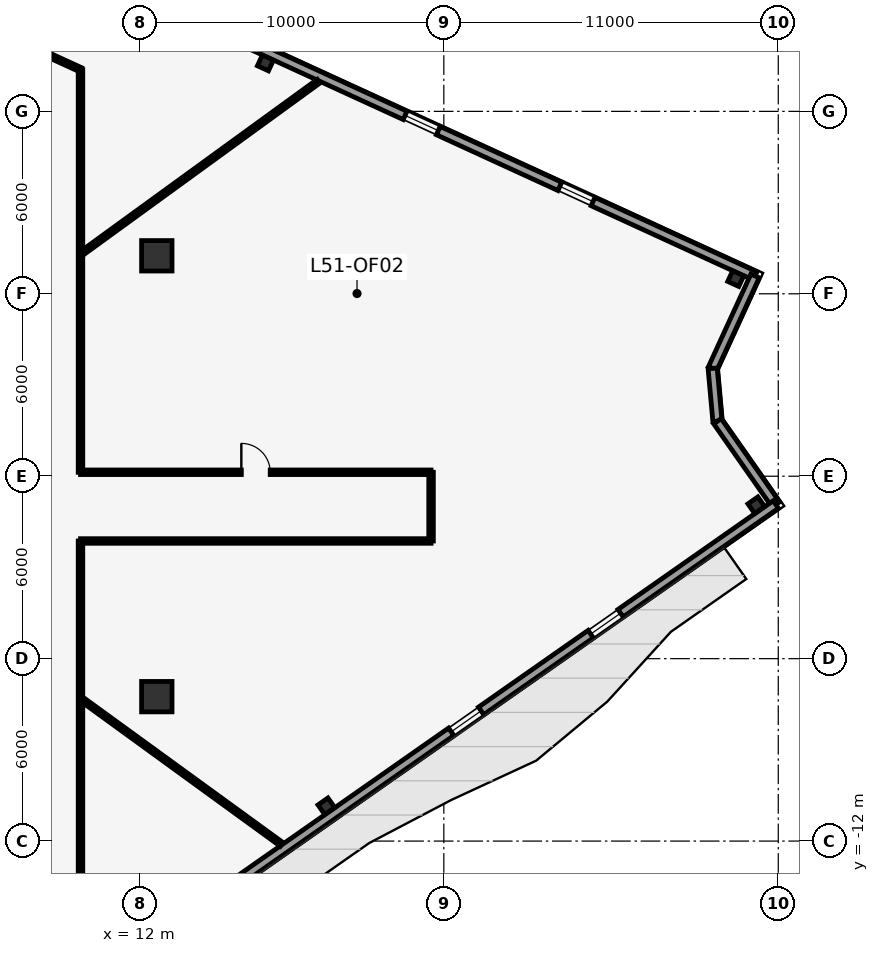
"""IFC4 building model, lengths in metres.
Left out: names, types, materials, properties, quantities, classifications, styles, units other than length and angle.
Written with IfcOpenShell. Run it as: python <this file> out.ifc"""

import sys

from ifc_helpers import new_model, si_unit, direction, frame, frame_2d, origin, origin_2d, place, context, subcontext, project, spatial, rectangle, i_section, extrude, element, fill, save


model = new_model("IFC4")
c1 = context("Model", 3, precision=1e-05, world=origin(), true_north=direction((0.0, 1.0)))
c2 = subcontext(c1, "Body", "Model", "MODEL_VIEW")
j1 = project(units=[si_unit("LENGTHUNIT", "METRE"), si_unit("PLANEANGLEUNIT", "RADIAN")], contexts=[c1])
p1 = place(None, origin())
s1 = spatial("IfcSite", under=j1, at=p1, CompositionType="ELEMENT")
p2 = place(p1, origin())
s2 = spatial("IfcBuilding", under=s1, at=p2, CompositionType="ELEMENT")
p3 = place(p2, frame((0.0, 0.0, 218.8)))
s3 = spatial("IfcBuildingStorey", under=s2, at=p3, CompositionType="ELEMENT", Elevation=218.8)
for number, where, z_axis, x_axis in (
    (1, (12.56, -7.25, 0.0), (0.0, 0.0, 1.0), (1.0, 0.0, 0.0)),
    (2, (12.56, 7.25, 0.0), (0.0, 0.0, 1.0), (1.0, 0.0, 0.0)),
):
    element("IfcColumn", number, at=place(p3, frame(where, z_axis=z_axis, x_axis=x_axis)), inside=s3, PredefinedType="COLUMN", context=c2, shape_type="SweptSolid", body=[
        extrude(rectangle(XDim=1.0, YDim=1.0, at=origin_2d()), origin(), (0.0, 0.0, 1.0), 4.1),
    ])
for number, where, z_axis, x_axis in (
    (3, (18.137, -10.854, 0.0), (0.0, 0.0, 1.0), (0.819, 0.574, 0.0)),
    (4, (32.277, -0.953, 0.0), (0.0, 0.0, 1.0), (0.819, 0.574, 0.0)),
    (5, (31.601, 6.499, 0.0), (0.0, 0.0, 1.0), (-0.909, 0.417, 0.0)),
    (6, (16.132, 13.592, 0.0), (0.0, 0.0, 1.0), (-0.909, 0.417, 0.0)),
):
    element("IfcColumn", number, at=place(p3, frame(where, z_axis=z_axis, x_axis=x_axis)), inside=s3, PredefinedType="COLUMN", context=c2, shape_type="SweptSolid", body=[
        extrude(i_section(OverallWidth=0.399, OverallDepth=0.386, WebThickness=0.021, FlangeThickness=0.033, at=origin_2d()), origin(), (0.0, 0.0, 1.0), 4.1),
    ])
p4 = place(p3, frame((-15.144, 28.322, 0.0), z_axis=(0.0, 0.0, 1.0), x_axis=(0.908932099953, -0.416944166136, 0.0)))
e7 = element("IfcWall", 7, at=p4, inside=s3, PredefinedType="STANDARD", context=c2, shape_type="SweptSolid", body=[
    extrude(rectangle(XDim=52.128, YDim=0.3, at=frame_2d((26.064, 0.0))), origin(), (0.0, 0.0, 1.0), 3.85),
])
p5 = place(p4, frame((5.864, 0.0, 0.85)))
e8 = element("IfcOpeningElement", 8, at=p5, cuts=e7, PredefinedType="OPENING", context=c2, shape_type="SweptSolid", body=[
    extrude(rectangle(XDim=1.2, YDim=2.2, at=frame_2d((0.6, 1.1))), frame((0.0, 0.16, 0.0), z_axis=(0.0, -1.0, 0.0), x_axis=(1.0, 0.0, 0.0)), (0.0, 0.0, 1.0), 0.32),
])
p6 = place(p4, frame((22.664, 0.0, 0.85)))
e9 = element("IfcOpeningElement", 9, at=p6, cuts=e7, PredefinedType="OPENING", context=c2, shape_type="SweptSolid", body=[
    extrude(rectangle(XDim=1.2, YDim=2.2, at=frame_2d((0.6, 1.1))), frame((0.0, 0.16, 0.0), z_axis=(0.0, -1.0, 0.0), x_axis=(1.0, 0.0, 0.0)), (0.0, 0.0, 1.0), 0.32),
])
p7 = place(p4, frame((28.264, 0.0, 0.85)))
e10 = element("IfcOpeningElement", 10, at=p7, cuts=e7, PredefinedType="OPENING", context=c2, shape_type="SweptSolid", body=[
    extrude(rectangle(XDim=1.2, YDim=2.2, at=frame_2d((0.6, 1.1))), frame((0.0, 0.16, 0.0), z_axis=(0.0, -1.0, 0.0), x_axis=(1.0, 0.0, 0.0)), (0.0, 0.0, 1.0), 0.32),
])
p8 = place(p4, frame((39.464, 0.0, 0.85)))
e11 = element("IfcOpeningElement", 11, at=p8, cuts=e7, PredefinedType="OPENING", context=c2, shape_type="SweptSolid", body=[
    extrude(rectangle(XDim=1.2, YDim=2.2, at=frame_2d((0.6, 1.1))), frame((0.0, 0.16, 0.0), z_axis=(0.0, -1.0, 0.0), x_axis=(1.0, 0.0, 0.0)), (0.0, 0.0, 1.0), 0.32),
])
p9 = place(p4, frame((45.064, 0.0, 0.85)))
e12 = element("IfcOpeningElement", 12, at=p9, cuts=e7, PredefinedType="OPENING", context=c2, shape_type="SweptSolid", body=[
    extrude(rectangle(XDim=1.2, YDim=2.2, at=frame_2d((0.6, 1.1))), frame((0.0, 0.16, 0.0), z_axis=(0.0, -1.0, 0.0), x_axis=(1.0, 0.0, 0.0)), (0.0, 0.0, 1.0), 0.32),
])
p10 = place(p3, frame((32.237, 6.587, 0.0), z_axis=(0.0, 0.0, 1.0), x_axis=(-0.416956203263, -0.908926578201, 0.0)))
e13 = element("IfcWall", 13, at=p10, inside=s3, PredefinedType="STANDARD", context=c2, shape_type="SweptSolid", body=[
    extrude(rectangle(XDim=3.346, YDim=0.3, at=frame_2d((1.673, 0.0))), origin(), (0.0, 0.0, 1.0), 3.85),
])
p11 = place(p3, frame((30.842, 3.546, 0.0), z_axis=(0.0, 0.0, 1.0), x_axis=(0.09030850916, -0.995913838228, 0.0)))
e14 = element("IfcWall", 14, at=p11, inside=s3, PredefinedType="STANDARD", context=c2, shape_type="SweptSolid", body=[
    extrude(rectangle(XDim=1.744, YDim=0.3, at=frame_2d((0.872, 0.0))), origin(), (0.0, 0.0, 1.0), 3.85),
])
p12 = place(p3, frame((31.0, 1.81, 0.0), z_axis=(0.0, 0.0, 1.0), x_axis=(0.573550493689, -0.819170208925, 0.0)))
e15 = element("IfcWall", 15, at=p12, inside=s3, PredefinedType="STANDARD", context=c2, shape_type="SweptSolid", body=[
    extrude(rectangle(XDim=3.346, YDim=0.3, at=frame_2d((1.673, 0.0))), origin(), (0.0, 0.0, 1.0), 3.85),
])
p13 = place(p3, frame((32.918, -0.931, 0.0), z_axis=(0.0, 0.0, 1.0), x_axis=(-0.819151415939, -0.573577333727, 0.0)))
e16 = element("IfcWall", 16, at=p13, inside=s3, PredefinedType="STANDARD", context=c2, shape_type="SweptSolid", body=[
    extrude(rectangle(XDim=52.863, YDim=0.3, at=frame_2d((26.431, 0.0))), origin(), (0.0, 0.0, 1.0), 3.85),
])
p14 = place(p13, frame((25.931, 0.0, 0.0)))
e17 = element("IfcOpeningElement", 17, at=p14, cuts=e16, PredefinedType="OPENING", context=c2, shape_type="SweptSolid", body=[
    extrude(rectangle(XDim=1.0, YDim=2.15, at=frame_2d((0.5, 1.075))), frame((0.0, 0.16, 0.0), z_axis=(0.0, -1.0, 0.0), x_axis=(1.0, 0.0, 0.0)), (0.0, 0.0, 1.0), 0.32),
])
p15 = place(p13, frame((6.231, 0.0, 0.85)))
e18 = element("IfcOpeningElement", 18, at=p15, cuts=e16, PredefinedType="OPENING", context=c2, shape_type="SweptSolid", body=[
    extrude(rectangle(XDim=1.2, YDim=2.2, at=frame_2d((0.6, 1.1))), frame((0.0, 0.16, 0.0), z_axis=(0.0, -1.0, 0.0), x_axis=(1.0, 0.0, 0.0)), (0.0, 0.0, 1.0), 0.32),
])
p16 = place(p13, frame((11.831, 0.0, 0.85)))
e19 = element("IfcOpeningElement", 19, at=p16, cuts=e16, PredefinedType="OPENING", context=c2, shape_type="SweptSolid", body=[
    extrude(rectangle(XDim=1.2, YDim=2.2, at=frame_2d((0.6, 1.1))), frame((0.0, 0.16, 0.0), z_axis=(0.0, -1.0, 0.0), x_axis=(1.0, 0.0, 0.0)), (0.0, 0.0, 1.0), 0.32),
])
p17 = place(p13, frame((23.031, 0.0, 0.85)))
e20 = element("IfcOpeningElement", 20, at=p17, cuts=e16, PredefinedType="OPENING", context=c2, shape_type="SweptSolid", body=[
    extrude(rectangle(XDim=1.2, YDim=2.2, at=frame_2d((0.6, 1.1))), frame((0.0, 0.16, 0.0), z_axis=(0.0, -1.0, 0.0), x_axis=(1.0, 0.0, 0.0)), (0.0, 0.0, 1.0), 0.32),
])
p18 = place(p13, frame((28.631, 0.0, 0.85)))
e21 = element("IfcOpeningElement", 21, at=p18, cuts=e16, PredefinedType="OPENING", context=c2, shape_type="SweptSolid", body=[
    extrude(rectangle(XDim=1.2, YDim=2.2, at=frame_2d((0.6, 1.1))), frame((0.0, 0.16, 0.0), z_axis=(0.0, -1.0, 0.0), x_axis=(1.0, 0.0, 0.0)), (0.0, 0.0, 1.0), 0.32),
])
p19 = place(p13, frame((39.831, 0.0, 0.85)))
e22 = element("IfcOpeningElement", 22, at=p19, cuts=e16, PredefinedType="OPENING", context=c2, shape_type="SweptSolid", body=[
    extrude(rectangle(XDim=1.2, YDim=2.2, at=frame_2d((0.6, 1.1))), frame((0.0, 0.16, 0.0), z_axis=(0.0, -1.0, 0.0), x_axis=(1.0, 0.0, 0.0)), (0.0, 0.0, 1.0), 0.32),
])
p20 = place(p13, frame((45.431, 0.0, 0.85)))
e23 = element("IfcOpeningElement", 23, at=p20, cuts=e16, PredefinedType="OPENING", context=c2, shape_type="SweptSolid", body=[
    extrude(rectangle(XDim=1.2, YDim=2.2, at=frame_2d((0.6, 1.1))), frame((0.0, 0.16, 0.0), z_axis=(0.0, -1.0, 0.0), x_axis=(1.0, 0.0, 0.0)), (0.0, 0.0, 1.0), 0.32),
])
p21 = place(p3, frame((7.79, 14.408, 0.0), z_axis=(0.0, 0.0, 1.0), x_axis=(0.908908252736, -0.416996148792, 0.0)))
e24 = element("IfcWall", 24, at=p21, inside=s3, PredefinedType="PARTITIONING", context=c2, shape_type="SweptSolid", body=[
    extrude(rectangle(XDim=2.487, YDim=0.15, at=frame_2d((1.243, 0.0))), origin(), (0.0, 0.0, 1.0), 3.85),
])
p22 = place(p3, frame((10.05, 13.371, 0.0), z_axis=(0.0, 0.0, 1.0), x_axis=(0.0, -1.0, 0.0)))
e25 = element("IfcWall", 25, at=p22, inside=s3, PredefinedType="PARTITIONING", context=c2, shape_type="SweptSolid", body=[
    extrude(rectangle(XDim=13.241, YDim=0.15, at=frame_2d((6.621, 0.0))), origin(), (0.0, 0.0, 1.0), 3.85),
])
p23 = place(p3, frame((10.05, 0.13, 0.0), z_axis=(0.0, 0.0, 1.0), x_axis=(1.0, 0.0, 0.0)))
e26 = element("IfcWall", 26, at=p23, inside=s3, PredefinedType="PARTITIONING", context=c2, shape_type="SweptSolid", body=[
    extrude(rectangle(XDim=11.53, YDim=0.15, at=frame_2d((5.765, 0.0))), origin(), (0.0, 0.0, 1.0), 3.85),
])
p24 = place(p23, frame((5.29, 0.0, 0.0)))
e27 = element("IfcOpeningElement", 27, at=p24, cuts=e26, PredefinedType="OPENING", context=c2, shape_type="SweptSolid", body=[
    extrude(rectangle(XDim=0.95, YDim=2.15, at=frame_2d((0.475, 1.075))), frame((0.0, 0.085, 0.0), z_axis=(0.0, -1.0, 0.0), x_axis=(1.0, 0.0, 0.0)), (0.0, 0.0, 1.0), 0.17),
])
p25 = place(p3, frame((21.58, 0.13, 0.0), z_axis=(0.0, 0.0, 1.0), x_axis=(0.0, -1.0, 0.0)))
e28 = element("IfcWall", 28, at=p25, inside=s3, PredefinedType="PARTITIONING", context=c2, shape_type="SweptSolid", body=[
    extrude(rectangle(XDim=2.26, YDim=0.15, at=frame_2d((1.13, 0.0))), origin(), (0.0, 0.0, 1.0), 3.85),
])
p26 = place(p3, frame((21.58, -2.13, 0.0), z_axis=(0.0, 0.0, 1.0), x_axis=(-1.0, 0.0, 0.0)))
e29 = element("IfcWall", 29, at=p26, inside=s3, PredefinedType="PARTITIONING", context=c2, shape_type="SweptSolid", body=[
    extrude(rectangle(XDim=11.53, YDim=0.15, at=frame_2d((5.765, 0.0))), origin(), (0.0, 0.0, 1.0), 3.85),
])
p27 = place(p3, frame((10.05, -2.13, 0.0), z_axis=(0.0, 0.0, 1.0), x_axis=(0.0, -1.0, 0.0)))
e30 = element("IfcWall", 30, at=p27, inside=s3, PredefinedType="PARTITIONING", context=c2, shape_type="SweptSolid", body=[
    extrude(rectangle(XDim=11.048, YDim=0.15, at=frame_2d((5.524, 0.0))), origin(), (0.0, 0.0, 1.0), 3.85),
])
p28 = place(p3, frame((10.155, 7.378, 0.0), z_axis=(0.0, 0.0, 1.0), x_axis=(0.809018998298, 0.587782494119, 0.0)))
e31 = element("IfcWall", 31, at=p28, inside=s3, PredefinedType="PARTITIONING", context=c2, shape_type="SweptSolid", body=[
    extrude(rectangle(XDim=9.55, YDim=0.15, at=frame_2d((4.775, 0.0))), origin(), (0.0, 0.0, 1.0), 3.85),
])
p29 = place(p3, frame((10.155, -7.378, 0.0), z_axis=(0.0, 0.0, 1.0), x_axis=(0.809021931729, -0.587778456548, 0.0)))
e32 = element("IfcWall", 32, at=p29, inside=s3, PredefinedType="PARTITIONING", context=c2, shape_type="SweptSolid", body=[
    extrude(rectangle(XDim=8.049, YDim=0.15, at=frame_2d((4.024, 0.0))), origin(), (0.0, 0.0, 1.0), 3.85),
])
p30 = place(p8, origin())
e33 = element("IfcWindow", 33, at=p30, inside=s3, PartitioningType="SINGLE_PANEL", PredefinedType="WINDOW", context=c2, shape_type="SweptSolid", body=[
    extrude(rectangle(XDim=1.2, YDim=2.2, at=frame_2d((0.6, 1.1))), frame((0.0, 0.03, 0.0), z_axis=(0.0, -1.0, 0.0), x_axis=(1.0, 0.0, 0.0)), (0.0, 0.0, 1.0), 0.06),
])
fill(e11, e33)
p31 = place(p9, origin())
e34 = element("IfcWindow", 34, at=p31, inside=s3, PartitioningType="SINGLE_PANEL", PredefinedType="WINDOW", context=c2, shape_type="SweptSolid", body=[
    extrude(rectangle(XDim=1.2, YDim=2.2, at=frame_2d((0.6, 1.1))), frame((0.0, 0.03, 0.0), z_axis=(0.0, -1.0, 0.0), x_axis=(1.0, 0.0, 0.0)), (0.0, 0.0, 1.0), 0.06),
])
fill(e12, e34)
p32 = place(p15, origin())
e35 = element("IfcWindow", 35, at=p32, inside=s3, PartitioningType="SINGLE_PANEL", PredefinedType="WINDOW", context=c2, shape_type="SweptSolid", body=[
    extrude(rectangle(XDim=1.2, YDim=2.2, at=frame_2d((0.6, 1.1))), frame((0.0, 0.03, 0.0), z_axis=(0.0, -1.0, 0.0), x_axis=(1.0, 0.0, 0.0)), (0.0, 0.0, 1.0), 0.06),
])
fill(e18, e35)
p33 = place(p16, origin())
e36 = element("IfcWindow", 36, at=p33, inside=s3, PartitioningType="SINGLE_PANEL", PredefinedType="WINDOW", context=c2, shape_type="SweptSolid", body=[
    extrude(rectangle(XDim=1.2, YDim=2.2, at=frame_2d((0.6, 1.1))), frame((0.0, 0.03, 0.0), z_axis=(0.0, -1.0, 0.0), x_axis=(1.0, 0.0, 0.0)), (0.0, 0.0, 1.0), 0.06),
])
fill(e19, e36)
p34 = place(p24, origin())
e37 = element("IfcDoor", 37, at=p34, inside=s3, OperationType="SINGLE_SWING_LEFT", PredefinedType="DOOR", context=c2, shape_type="SweptSolid", body=[
    extrude(rectangle(XDim=0.95, YDim=2.15, at=frame_2d((0.475, 1.075))), frame((0.0, 0.025, 0.0), z_axis=(0.0, -1.0, 0.0), x_axis=(1.0, 0.0, 0.0)), (0.0, 0.0, 1.0), 0.05),
])
fill(e27, e37)
save(model, sys.argv[1])
